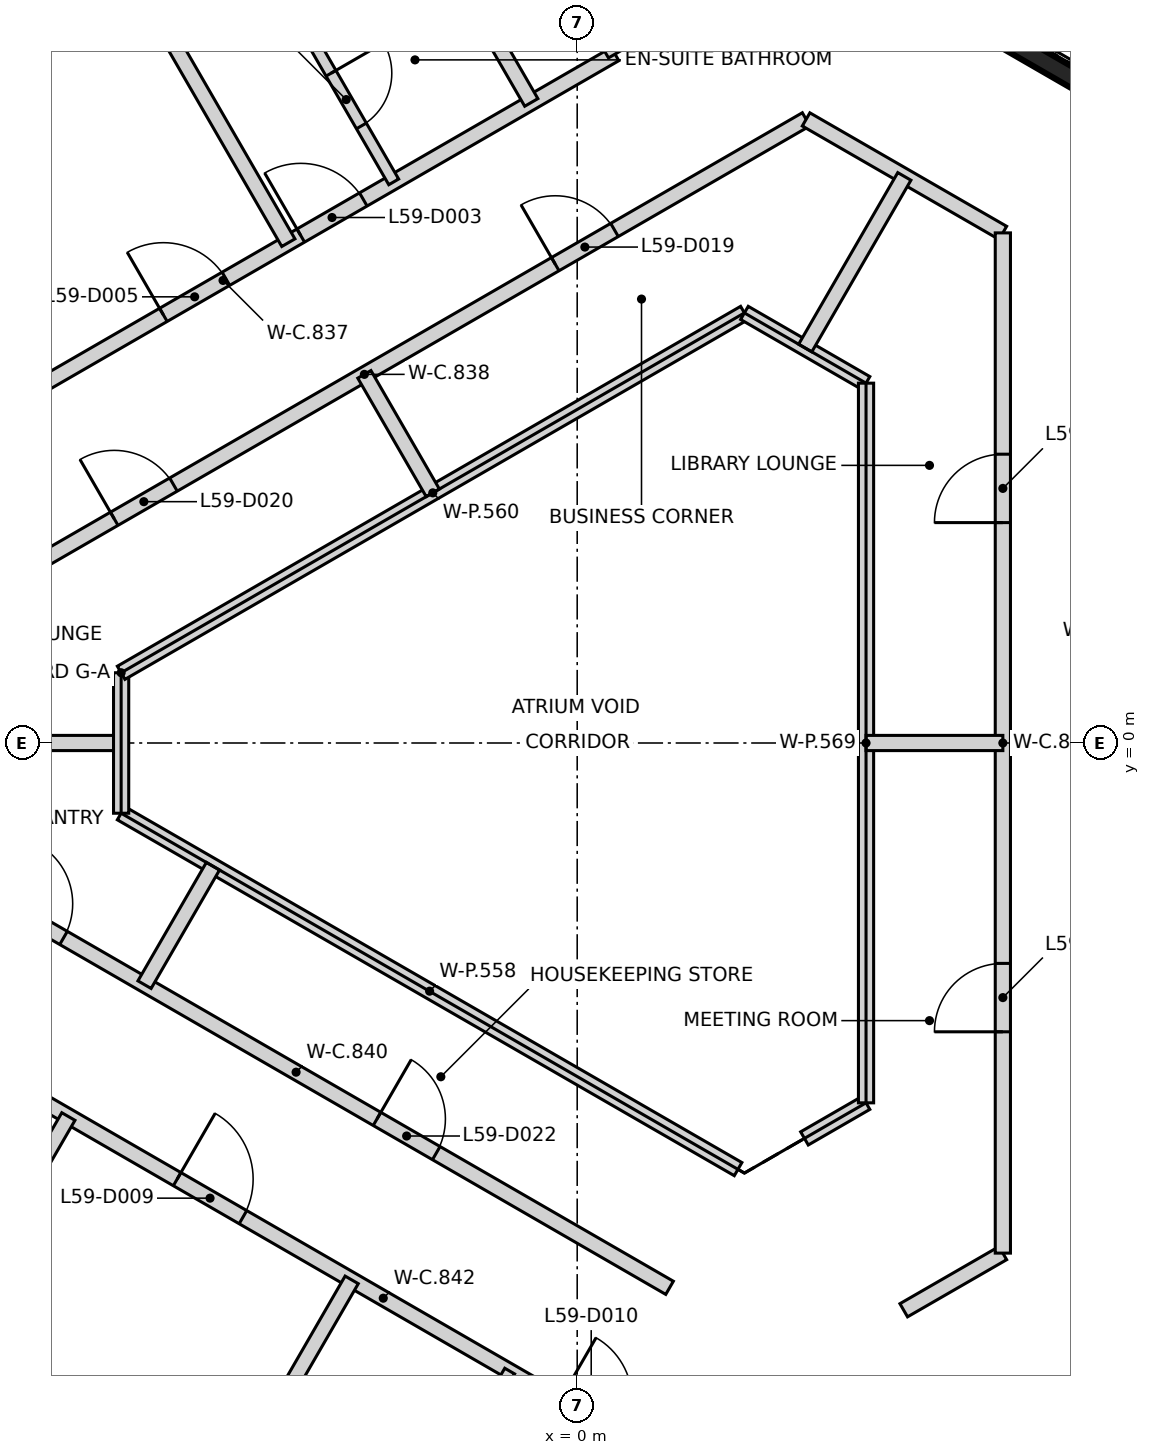
"""IFC4 building model, lengths in metres.
Left out: names, types, materials, properties, quantities, classifications, styles, units other than length and angle.
Written with IfcOpenShell. Run it as: python <this file> out.ifc"""

import sys

from ifc_helpers import new_model, si_unit, direction, frame, frame_2d, origin, place, context, subcontext, project, spatial, rectangle, extrude, element, fill, save


model = new_model("IFC4")
c1 = context("Model", 3, precision=1e-05, world=origin(), true_north=direction((0.0, 1.0)))
c2 = subcontext(c1, "Body", "Model", "MODEL_VIEW")
j1 = project(units=[si_unit("LENGTHUNIT", "METRE"), si_unit("PLANEANGLEUNIT", "RADIAN")], contexts=[c1])
p1 = place(None, origin())
s1 = spatial("IfcSite", under=j1, at=p1, CompositionType="ELEMENT")
p2 = place(p1, origin())
s2 = spatial("IfcBuilding", under=s1, at=p2, CompositionType="ELEMENT")
p3 = place(p2, frame((0.0, 0.0, 235.8)))
s3 = spatial("IfcBuildingStorey", under=s2, at=p3, CompositionType="ELEMENT", Elevation=235.8)
p4 = place(p3, frame((10.42, 6.498, 0.0), z_axis=(0.0, 0.0, 1.0), x_axis=(-0.866021906294, 0.500006057782, 0.0)))
e1 = element("IfcWall", 1, at=p4, inside=s3, PredefinedType="SHEAR", context=c2, shape_type="SweptSolid", body=[
    extrude(rectangle(XDim=11.55, YDim=0.25, at=frame_2d((5.775, 0.0))), origin(), (0.0, 0.0, 1.0), 3.25),
])
p5 = place(p4, frame((10.025, 0.0, 0.0)))
e2 = element("IfcOpeningElement", 2, at=p5, cuts=e1, PredefinedType="OPENING", context=c2, shape_type="SweptSolid", body=[
    extrude(rectangle(XDim=1.2, YDim=2.1, at=frame_2d((0.6, 1.05))), frame((0.0, 0.135, 0.0), z_axis=(0.0, -1.0, 0.0), x_axis=(1.0, 0.0, 0.0)), (0.0, 0.0, 1.0), 0.27),
])
p6 = place(p4, frame((8.725, 0.0, 0.0)))
e3 = element("IfcOpeningElement", 3, at=p6, cuts=e1, PredefinedType="OPENING", context=c2, shape_type="SweptSolid", body=[
    extrude(rectangle(XDim=1.2, YDim=2.1, at=frame_2d((0.6, 1.05))), frame((0.0, 0.135, 0.0), z_axis=(0.0, -1.0, 0.0), x_axis=(1.0, 0.0, 0.0)), (0.0, 0.0, 1.0), 0.27),
])
p7 = place(p3, frame((0.417, -12.273, 0.0), z_axis=(0.0, 0.0, 1.0), x_axis=(0.866021906294, 0.500006057782, 0.0)))
e4 = element("IfcWall", 4, at=p7, inside=s3, PredefinedType="SHEAR", context=c2, shape_type="SweptSolid", body=[
    extrude(rectangle(XDim=11.55, YDim=0.25, at=frame_2d((5.775, 0.0))), origin(), (0.0, 0.0, 1.0), 3.25),
])
p8 = place(p7, frame((10.025, 0.0, 0.0)))
e5 = element("IfcOpeningElement", 5, at=p8, cuts=e4, PredefinedType="OPENING", context=c2, shape_type="SweptSolid", body=[
    extrude(rectangle(XDim=1.2, YDim=2.1, at=frame_2d((0.6, 1.05))), frame((0.0, 0.135, 0.0), z_axis=(0.0, -1.0, 0.0), x_axis=(1.0, 0.0, 0.0)), (0.0, 0.0, 1.0), 0.27),
])
p9 = place(p7, frame((8.725, 0.0, 0.0)))
e6 = element("IfcOpeningElement", 6, at=p9, cuts=e4, PredefinedType="OPENING", context=c2, shape_type="SweptSolid", body=[
    extrude(rectangle(XDim=1.2, YDim=2.1, at=frame_2d((0.6, 1.05))), frame((0.0, 0.135, 0.0), z_axis=(0.0, -1.0, 0.0), x_axis=(1.0, 0.0, 0.0)), (0.0, 0.0, 1.0), 0.27),
])
p10 = place(p3, frame((-9.817, 3.108, 0.0), z_axis=(0.0, 0.0, 1.0), x_axis=(0.86603471326, 0.499983875168, 0.0)))
e7 = element("IfcWall", 7, at=p10, inside=s3, PredefinedType="PARTITIONING", context=c2, shape_type="SweptSolid", body=[
    extrude(rectangle(XDim=11.911, YDim=0.2, at=frame_2d((5.955, 0.0))), origin(), (0.0, 0.0, 1.0), 3.25),
])
p11 = place(p10, frame((7.136, 0.0, 0.0)))
e8 = element("IfcOpeningElement", 8, at=p11, cuts=e7, PredefinedType="OPENING", context=c2, shape_type="SweptSolid", body=[
    extrude(rectangle(XDim=0.95, YDim=2.1, at=frame_2d((0.475, 1.05))), frame((0.0, 0.11, 0.0), z_axis=(0.0, -1.0, 0.0), x_axis=(1.0, 0.0, 0.0)), (0.0, 0.0, 1.0), 0.22),
])
p12 = place(p10, frame((5.049, 0.0, 0.0)))
e9 = element("IfcOpeningElement", 9, at=p12, cuts=e7, PredefinedType="OPENING", context=c2, shape_type="SweptSolid", body=[
    extrude(rectangle(XDim=0.95, YDim=2.1, at=frame_2d((0.475, 1.05))), frame((0.0, 0.11, 0.0), z_axis=(0.0, -1.0, 0.0), x_axis=(1.0, 0.0, 0.0)), (0.0, 0.0, 1.0), 0.22),
])
p13 = place(p3, frame((-8.612, 1.494, 0.0), z_axis=(0.0, 0.0, 1.0), x_axis=(0.8660441356, 0.49996755414, 0.0)))
e10 = element("IfcWall", 10, at=p13, inside=s3, PredefinedType="PARTITIONING", context=c2, shape_type="SweptSolid", body=[
    extrude(rectangle(XDim=13.422, YDim=0.2, at=frame_2d((6.711, 0.0))), origin(), (0.0, 0.0, 1.0), 3.25),
])
p14 = place(p13, frame((9.611, 0.0, 0.0)))
e11 = element("IfcOpeningElement", 11, at=p14, cuts=e10, PredefinedType="OPENING", context=c2, shape_type="SweptSolid", body=[
    extrude(rectangle(XDim=0.9, YDim=2.1, at=frame_2d((0.45, 1.05))), frame((0.0, 0.11, 0.0), z_axis=(0.0, -1.0, 0.0), x_axis=(1.0, 0.0, 0.0)), (0.0, 0.0, 1.0), 0.22),
])
p15 = place(p13, frame((2.911, 0.0, 0.0)))
e12 = element("IfcOpeningElement", 12, at=p15, cuts=e10, PredefinedType="OPENING", context=c2, shape_type="SweptSolid", body=[
    extrude(rectangle(XDim=0.9, YDim=2.1, at=frame_2d((0.45, 1.05))), frame((0.0, 0.11, 0.0), z_axis=(0.0, -1.0, 0.0), x_axis=(1.0, 0.0, 0.0)), (0.0, 0.0, 1.0), 0.22),
])
p16 = place(p3, frame((-8.612, -1.494, 0.0), z_axis=(0.0, 0.0, 1.0), x_axis=(0.866035468681, -0.499982566683, 0.0)))
e13 = element("IfcWall", 13, at=p16, inside=s3, PredefinedType="PARTITIONING", context=c2, shape_type="SweptSolid", body=[
    extrude(rectangle(XDim=11.348, YDim=0.2, at=frame_2d((5.674, 0.0))), origin(), (0.0, 0.0, 1.0), 3.25),
])
p17 = place(p16, frame((1.241, 0.0, 0.0)))
e14 = element("IfcOpeningElement", 14, at=p17, cuts=e13, PredefinedType="OPENING", context=c2, shape_type="SweptSolid", body=[
    extrude(rectangle(XDim=0.9, YDim=2.1, at=frame_2d((0.45, 1.05))), frame((0.0, 0.11, 0.0), z_axis=(0.0, -1.0, 0.0), x_axis=(1.0, 0.0, 0.0)), (0.0, 0.0, 1.0), 0.22),
])
p18 = place(p16, frame((6.903, 0.0, 0.0)))
e15 = element("IfcOpeningElement", 15, at=p18, cuts=e13, PredefinedType="OPENING", context=c2, shape_type="SweptSolid", body=[
    extrude(rectangle(XDim=0.9, YDim=2.1, at=frame_2d((0.45, 1.05))), frame((0.0, 0.11, 0.0), z_axis=(0.0, -1.0, 0.0), x_axis=(1.0, 0.0, 0.0)), (0.0, 0.0, 1.0), 0.22),
])
p19 = place(p3, frame((-8.153, -4.069, 0.0), z_axis=(0.0, 0.0, 1.0), x_axis=(0.865955522833, -0.500121017829, 0.0)))
e16 = element("IfcWall", 16, at=p19, inside=s3, PredefinedType="PARTITIONING", context=c2, shape_type="SweptSolid", body=[
    extrude(rectangle(XDim=12.937, YDim=0.2, at=frame_2d((6.469, 0.0))), origin(), (0.0, 0.0, 1.0), 3.25),
])
p20 = place(p19, frame((3.337, 0.0, 0.0)))
e17 = element("IfcOpeningElement", 17, at=p20, cuts=e16, PredefinedType="OPENING", context=c2, shape_type="SweptSolid", body=[
    extrude(rectangle(XDim=1.0, YDim=2.1, at=frame_2d((0.5, 1.05))), frame((0.0, 0.11, 0.0), z_axis=(0.0, -1.0, 0.0), x_axis=(1.0, 0.0, 0.0)), (0.0, 0.0, 1.0), 0.22),
])
p21 = place(p19, frame((9.153, 0.0, 0.0)))
e18 = element("IfcOpeningElement", 18, at=p21, cuts=e16, PredefinedType="OPENING", context=c2, shape_type="SweptSolid", body=[
    extrude(rectangle(XDim=0.95, YDim=2.1, at=frame_2d((0.475, 1.05))), frame((0.0, 0.11, 0.0), z_axis=(0.0, -1.0, 0.0), x_axis=(1.0, 0.0, 0.0)), (0.0, 0.0, 1.0), 0.22),
])
p22 = place(p19, frame((11.144, 0.0, 0.0)))
e19 = element("IfcOpeningElement", 19, at=p22, cuts=e16, PredefinedType="OPENING", context=c2, shape_type="SweptSolid", body=[
    extrude(rectangle(XDim=1.0, YDim=2.1, at=frame_2d((0.5, 1.05))), frame((0.0, 0.11, 0.0), z_axis=(0.0, -1.0, 0.0), x_axis=(1.0, 0.0, 0.0)), (0.0, 0.0, 1.0), 0.22),
])
p23 = place(p3, frame((-0.964, 11.595, 0.0), z_axis=(0.0, 0.0, 1.0), x_axis=(0.500081432713, -0.865978383481, 0.0)))
e20 = element("IfcWall", 20, at=p23, inside=s3, PredefinedType="PARTITIONING", context=c2, shape_type="SweptSolid", body=[
    extrude(rectangle(XDim=2.924, YDim=0.2, at=frame_2d((1.462, 0.0))), origin(), (0.0, 0.0, 1.0), 3.25),
])
p24 = place(p23, frame((0.962, 0.0, 0.0)))
e21 = element("IfcOpeningElement", 21, at=p24, cuts=e20, PredefinedType="OPENING", context=c2, shape_type="SweptSolid", body=[
    extrude(rectangle(XDim=1.0, YDim=2.1, at=frame_2d((0.5, 1.05))), frame((0.0, 0.11, 0.0), z_axis=(0.0, -1.0, 0.0), x_axis=(1.0, 0.0, 0.0)), (0.0, 0.0, 1.0), 0.22),
])
p25 = place(p3, frame((3.011, 8.204, 0.0), z_axis=(0.0, 0.0, 1.0), x_axis=(0.86628077395, -0.499557424812, 0.0)))
e22 = element("IfcWall", 22, at=p25, inside=s3, PredefinedType="PARTITIONING", context=c2, shape_type="SweptSolid", body=[
    extrude(rectangle(XDim=2.989, YDim=0.2, at=frame_2d((1.494, 0.0))), origin(), (0.0, 0.0, 1.0), 3.25),
])
p26 = place(p3, frame((4.296, -7.463, 0.0), z_axis=(0.0, 0.0, 1.0), x_axis=(0.86632054743, 0.499488447414, 0.0)))
e23 = element("IfcWall", 23, at=p26, inside=s3, PredefinedType="PARTITIONING", context=c2, shape_type="SweptSolid", body=[
    extrude(rectangle(XDim=1.505, YDim=0.2, at=frame_2d((0.753, 0.0))), origin(), (0.0, 0.0, 1.0), 3.25),
])
p27 = place(p3, frame((5.6, -6.711, 0.0), z_axis=(0.0, 0.0, 1.0), x_axis=(0.0, 1.0, 0.0)))
e24 = element("IfcWall", 24, at=p27, inside=s3, PredefinedType="PARTITIONING", context=c2, shape_type="SweptSolid", body=[
    extrude(rectangle(XDim=13.422, YDim=0.2, at=frame_2d((6.711, 0.0))), origin(), (0.0, 0.0, 1.0), 3.25),
])
p28 = place(p27, frame((2.912, 0.0, 0.0)))
e25 = element("IfcOpeningElement", 25, at=p28, cuts=e24, PredefinedType="OPENING", context=c2, shape_type="SweptSolid", body=[
    extrude(rectangle(XDim=0.9, YDim=2.1, at=frame_2d((0.45, 1.05))), frame((0.0, 0.11, 0.0), z_axis=(0.0, -1.0, 0.0), x_axis=(1.0, 0.0, 0.0)), (0.0, 0.0, 1.0), 0.22),
])
p29 = place(p27, frame((9.611, 0.0, 0.0)))
e26 = element("IfcOpeningElement", 26, at=p29, cuts=e24, PredefinedType="OPENING", context=c2, shape_type="SweptSolid", body=[
    extrude(rectangle(XDim=0.9, YDim=2.1, at=frame_2d((0.45, 1.05))), frame((0.0, 0.11, 0.0), z_axis=(0.0, -1.0, 0.0), x_axis=(1.0, 0.0, 0.0)), (0.0, 0.0, 1.0), 0.22),
])
p30 = place(p3, frame((-12.407, -14.806, 0.0), z_axis=(0.0, 0.0, 1.0), x_axis=(0.500104175471, 0.865965249693, 0.0)))
e27 = element("IfcWall", 27, at=p30, inside=s3, PredefinedType="PARTITIONING", context=c2, shape_type="SweptSolid", body=[
    extrude(rectangle(XDim=11.423, YDim=0.2, at=frame_2d((5.711, 0.0))), origin(), (0.0, 0.0, 1.0), 2.35),
])
p31 = place(p3, frame((-9.525, 16.498, 0.0), z_axis=(0.0, 0.0, 1.0), x_axis=(0.500030684965, -0.866007687087, 0.0)))
e28 = element("IfcWall", 28, at=p31, inside=s3, PredefinedType="PARTITIONING", context=c2, shape_type="SweptSolid", body=[
    extrude(rectangle(XDim=11.45, YDim=0.2, at=frame_2d((5.725, 0.0))), origin(), (0.0, 0.0, 1.0), 3.25),
])
p32 = place(p3, frame((-8.688, -16.973, 0.0), z_axis=(0.0, 0.0, 1.0), x_axis=(0.500021643343, 0.866012907634, 0.0)))
e29 = element("IfcWall", 29, at=p32, inside=s3, PredefinedType="PARTITIONING", context=c2, shape_type="SweptSolid", body=[
    extrude(rectangle(XDim=11.443, YDim=0.2, at=frame_2d((5.721, 0.0))), origin(), (0.0, 0.0, 1.0), 2.35),
])
p33 = place(p3, frame((-8.547, 0.0, 0.0), z_axis=(0.0, 0.0, 1.0), x_axis=(1.0, 0.0, 0.0)))
e30 = element("IfcWall", 30, at=p33, inside=s3, PredefinedType="PARTITIONING", context=c2, shape_type="SweptSolid", body=[
    extrude(rectangle(XDim=2.547, YDim=0.2, at=frame_2d((1.273, 0.0))), origin(), (0.0, 0.0, 1.0), 3.25),
])
p34 = place(p3, frame((-6.315, 18.32, 0.0), z_axis=(0.0, 0.0, 1.0), x_axis=(0.500012296027, -0.866018304553, 0.0)))
e31 = element("IfcWall", 31, at=p34, inside=s3, PredefinedType="PARTITIONING", context=c2, shape_type="SweptSolid", body=[
    extrude(rectangle(XDim=11.423, YDim=0.2, at=frame_2d((5.711, 0.0))), origin(), (0.0, 0.0, 1.0), 2.35),
])
p35 = place(p3, frame((-6.0, -0.924, 0.0), z_axis=(0.0, 0.0, 1.0), x_axis=(0.866223755075, -0.499656288007, 0.0)))
e32 = element("IfcWall", 32, at=p35, inside=s3, PredefinedType="PARTITIONING", context=c2, shape_type="SweptSolid", body=[
    extrude(rectangle(XDim=9.37, YDim=0.2, at=frame_2d((4.685, 0.0))), origin(), (0.0, 0.0, 1.0), 3.25),
])
p36 = place(p3, frame((-6.0, -0.924, 0.0), z_axis=(0.0, 0.0, 1.0), x_axis=(0.0, 1.0, 0.0)))
e33 = element("IfcWall", 33, at=p36, inside=s3, PredefinedType="PARTITIONING", context=c2, shape_type="SweptSolid", body=[
    extrude(rectangle(XDim=1.848, YDim=0.2, at=frame_2d((0.924, 0.0))), origin(), (0.0, 0.0, 1.0), 3.25),
])
p37 = place(p3, frame((-6.0, 0.924, 0.0), z_axis=(0.0, 0.0, 1.0), x_axis=(0.866012967051, 0.500021540435, 0.0)))
e34 = element("IfcWall", 34, at=p37, inside=s3, PredefinedType="PARTITIONING", context=c2, shape_type="SweptSolid", body=[
    extrude(rectangle(XDim=9.468, YDim=0.2, at=frame_2d((4.734, 0.0))), origin(), (0.0, 0.0, 1.0), 3.25),
])
for number, where, z_axis, x_axis in (
    (35, (-5.692, -3.179, 0.0), (0.0, 0.0, 1.0), (0.5, 0.866, 0.0)),
    (36, (-2.8, 4.85, 0.0), (0.0, 0.0, 1.0), (0.5, -0.866, 0.0)),
):
    element("IfcWall", number, at=place(p3, frame(where, z_axis=z_axis, x_axis=x_axis)), inside=s3, PredefinedType="PARTITIONING", context=c2, shape_type="SweptSolid", body=[
        extrude(rectangle(XDim=1.8, YDim=0.2, at=frame_2d((0.9, 0.0))), origin(), (0.0, 0.0, 1.0), 3.25),
    ])
p38 = place(p3, frame((2.2, 5.658, 0.0), z_axis=(0.0, 0.0, 1.0), x_axis=(0.865818011038, -0.500359042851, 0.0)))
e37 = element("IfcWall", 37, at=p38, inside=s3, PredefinedType="PARTITIONING", context=c2, shape_type="SweptSolid", body=[
    extrude(rectangle(XDim=1.848, YDim=0.2, at=frame_2d((0.924, 0.0))), origin(), (0.0, 0.0, 1.0), 3.25),
])
p39 = place(p3, frame((2.99, -5.202, 0.0), z_axis=(0.0, 0.0, 1.0), x_axis=(0.865872609263, 0.500264554538, 0.0)))
e38 = element("IfcWall", 38, at=p39, inside=s3, PredefinedType="PARTITIONING", context=c2, shape_type="SweptSolid", body=[
    extrude(rectangle(XDim=0.936, YDim=0.2, at=frame_2d((0.468, 0.0))), origin(), (0.0, 0.0, 1.0), 3.25),
])
p40 = place(p3, frame((3.0, 5.196, 0.0), z_axis=(0.0, 0.0, 1.0), x_axis=(0.500076354988, 0.865981315724, 0.0)))
e39 = element("IfcWall", 39, at=p40, inside=s3, PredefinedType="PARTITIONING", context=c2, shape_type="SweptSolid", body=[
    extrude(rectangle(XDim=2.607, YDim=0.2, at=frame_2d((1.304, 0.0))), origin(), (0.0, 0.0, 1.0), 3.25),
])
p41 = place(p3, frame((3.8, -4.734, 0.0), z_axis=(0.0, 0.0, 1.0), x_axis=(0.0, 1.0, 0.0)))
e40 = element("IfcWall", 40, at=p41, inside=s3, PredefinedType="PARTITIONING", context=c2, shape_type="SweptSolid", body=[
    extrude(rectangle(XDim=9.468, YDim=0.2, at=frame_2d((4.734, 0.0))), origin(), (0.0, 0.0, 1.0), 3.25),
])
p42 = place(p3, frame((3.8, 0.0, 0.0), z_axis=(0.0, 0.0, 1.0), x_axis=(1.0, 0.0, 0.0)))
e41 = element("IfcWall", 41, at=p42, inside=s3, PredefinedType="PARTITIONING", context=c2, shape_type="SweptSolid", body=[
    extrude(rectangle(XDim=1.8, YDim=0.2, at=frame_2d((0.9, 0.0))), origin(), (0.0, 0.0, 1.0), 3.25),
])
p43 = place(p3, frame((-3.664, 9.547, 0.0), z_axis=(0.0, 0.0, 1.0), x_axis=(0.500004234368, -0.866022959057, 0.0)))
e42 = element("IfcWall", 42, at=p43, inside=s3, PredefinedType="PARTITIONING", context=c2, shape_type="SweptSolid", body=[
    extrude(rectangle(XDim=2.5, YDim=0.15, at=frame_2d((1.25, 0.0))), origin(), (0.0, 0.0, 1.0), 3.25),
])
p44 = place(p43, frame((0.85, 0.0, 0.0)))
e43 = element("IfcOpeningElement", 43, at=p44, cuts=e42, PredefinedType="OPENING", context=c2, shape_type="SweptSolid", body=[
    extrude(rectangle(XDim=0.8, YDim=2.1, at=frame_2d((0.4, 1.05))), frame((0.0, 0.085, 0.0), z_axis=(0.0, -1.0, 0.0), x_axis=(1.0, 0.0, 0.0)), (0.0, 0.0, 1.0), 0.17),
])
p45 = place(p3, frame((-2.138, -10.428, 0.0), z_axis=(0.0, 0.0, 1.0), x_axis=(0.500004234368, 0.866022959057, 0.0)))
e44 = element("IfcWall", 44, at=p45, inside=s3, PredefinedType="PARTITIONING", context=c2, shape_type="SweptSolid", body=[
    extrude(rectangle(XDim=2.5, YDim=0.15, at=frame_2d((1.25, 0.0))), origin(), (0.0, 0.0, 1.0), 3.25),
])
p46 = place(p45, frame((0.85, 0.0, 0.0)))
e45 = element("IfcOpeningElement", 45, at=p46, cuts=e44, PredefinedType="OPENING", context=c2, shape_type="SweptSolid", body=[
    extrude(rectangle(XDim=0.8, YDim=2.1, at=frame_2d((0.4, 1.05))), frame((0.0, 0.085, 0.0), z_axis=(0.0, -1.0, 0.0), x_axis=(1.0, 0.0, 0.0)), (0.0, 0.0, 1.0), 0.17),
])
p47 = place(p11, origin())
e46 = element("IfcDoor", 46, at=p47, inside=s3, OperationType="SINGLE_SWING_LEFT", PredefinedType="DOOR", context=c2, shape_type="SweptSolid", body=[
    extrude(rectangle(XDim=0.95, YDim=2.1, at=frame_2d((0.475, 1.05))), frame((0.0, 0.025, 0.0), z_axis=(0.0, -1.0, 0.0), x_axis=(1.0, 0.0, 0.0)), (0.0, 0.0, 1.0), 0.05),
])
fill(e8, e46)
p48 = place(p44, origin())
e47 = element("IfcDoor", 47, at=p48, inside=s3, OperationType="SINGLE_SWING_LEFT", PredefinedType="DOOR", context=c2, shape_type="SweptSolid", body=[
    extrude(rectangle(XDim=0.8, YDim=2.1, at=frame_2d((0.4, 1.05))), frame((0.0, 0.025, 0.0), z_axis=(0.0, -1.0, 0.0), x_axis=(1.0, 0.0, 0.0)), (0.0, 0.0, 1.0), 0.05),
])
fill(e43, e47)
p49 = place(p12, origin())
e48 = element("IfcDoor", 48, at=p49, inside=s3, OperationType="SINGLE_SWING_LEFT", PredefinedType="DOOR", context=c2, shape_type="SweptSolid", body=[
    extrude(rectangle(XDim=0.95, YDim=2.1, at=frame_2d((0.475, 1.05))), frame((0.0, 0.025, 0.0), z_axis=(0.0, -1.0, 0.0), x_axis=(1.0, 0.0, 0.0)), (0.0, 0.0, 1.0), 0.05),
])
fill(e9, e48)
p50 = place(p20, frame((1.0, 0.0, 0.0), z_axis=(0.0, 0.0, 1.0), x_axis=(-1.0, 0.0, 0.0)))
e49 = element("IfcDoor", 49, at=p50, inside=s3, OperationType="SINGLE_SWING_LEFT", PredefinedType="DOOR", context=c2, shape_type="SweptSolid", body=[
    extrude(rectangle(XDim=1.0, YDim=2.1, at=frame_2d((0.5, 1.05))), frame((0.0, 0.025, 0.0), z_axis=(0.0, -1.0, 0.0), x_axis=(1.0, 0.0, 0.0)), (0.0, 0.0, 1.0), 0.05),
])
fill(e17, e49)
p51 = place(p28, origin())
e50 = element("IfcDoor", 50, at=p51, inside=s3, OperationType="SINGLE_SWING_LEFT", PredefinedType="DOOR", context=c2, shape_type="SweptSolid", body=[
    extrude(rectangle(XDim=0.9, YDim=2.1, at=frame_2d((0.45, 1.05))), frame((0.0, 0.025, 0.0), z_axis=(0.0, -1.0, 0.0), x_axis=(1.0, 0.0, 0.0)), (0.0, 0.0, 1.0), 0.05),
])
fill(e25, e50)
p52 = place(p29, origin())
e51 = element("IfcDoor", 51, at=p52, inside=s3, OperationType="SINGLE_SWING_LEFT", PredefinedType="DOOR", context=c2, shape_type="SweptSolid", body=[
    extrude(rectangle(XDim=0.9, YDim=2.1, at=frame_2d((0.45, 1.05))), frame((0.0, 0.025, 0.0), z_axis=(0.0, -1.0, 0.0), x_axis=(1.0, 0.0, 0.0)), (0.0, 0.0, 1.0), 0.05),
])
fill(e26, e51)
p53 = place(p14, frame((0.9, 0.0, 0.0), z_axis=(0.0, 0.0, 1.0), x_axis=(-1.0, 0.0, 0.0)))
e52 = element("IfcDoor", 52, at=p53, inside=s3, OperationType="SINGLE_SWING_LEFT", PredefinedType="DOOR", context=c2, shape_type="SweptSolid", body=[
    extrude(rectangle(XDim=0.9, YDim=2.1, at=frame_2d((0.45, 1.05))), frame((0.0, 0.025, 0.0), z_axis=(0.0, -1.0, 0.0), x_axis=(1.0, 0.0, 0.0)), (0.0, 0.0, 1.0), 0.05),
])
fill(e11, e52)
p54 = place(p15, frame((0.9, 0.0, 0.0), z_axis=(0.0, 0.0, 1.0), x_axis=(-1.0, 0.0, 0.0)))
e53 = element("IfcDoor", 53, at=p54, inside=s3, OperationType="SINGLE_SWING_LEFT", PredefinedType="DOOR", context=c2, shape_type="SweptSolid", body=[
    extrude(rectangle(XDim=0.9, YDim=2.1, at=frame_2d((0.45, 1.05))), frame((0.0, 0.025, 0.0), z_axis=(0.0, -1.0, 0.0), x_axis=(1.0, 0.0, 0.0)), (0.0, 0.0, 1.0), 0.05),
])
fill(e12, e53)
p55 = place(p17, origin())
e54 = element("IfcDoor", 54, at=p55, inside=s3, OperationType="SINGLE_SWING_LEFT", PredefinedType="DOOR", context=c2, shape_type="SweptSolid", body=[
    extrude(rectangle(XDim=0.9, YDim=2.1, at=frame_2d((0.45, 1.05))), frame((0.0, 0.025, 0.0), z_axis=(0.0, -1.0, 0.0), x_axis=(1.0, 0.0, 0.0)), (0.0, 0.0, 1.0), 0.05),
])
fill(e14, e54)
p56 = place(p18, origin())
e55 = element("IfcDoor", 55, at=p56, inside=s3, OperationType="SINGLE_SWING_LEFT", PredefinedType="DOOR", context=c2, shape_type="SweptSolid", body=[
    extrude(rectangle(XDim=0.9, YDim=2.1, at=frame_2d((0.45, 1.05))), frame((0.0, 0.025, 0.0), z_axis=(0.0, -1.0, 0.0), x_axis=(1.0, 0.0, 0.0)), (0.0, 0.0, 1.0), 0.05),
])
fill(e15, e55)
save(model, sys.argv[1])
